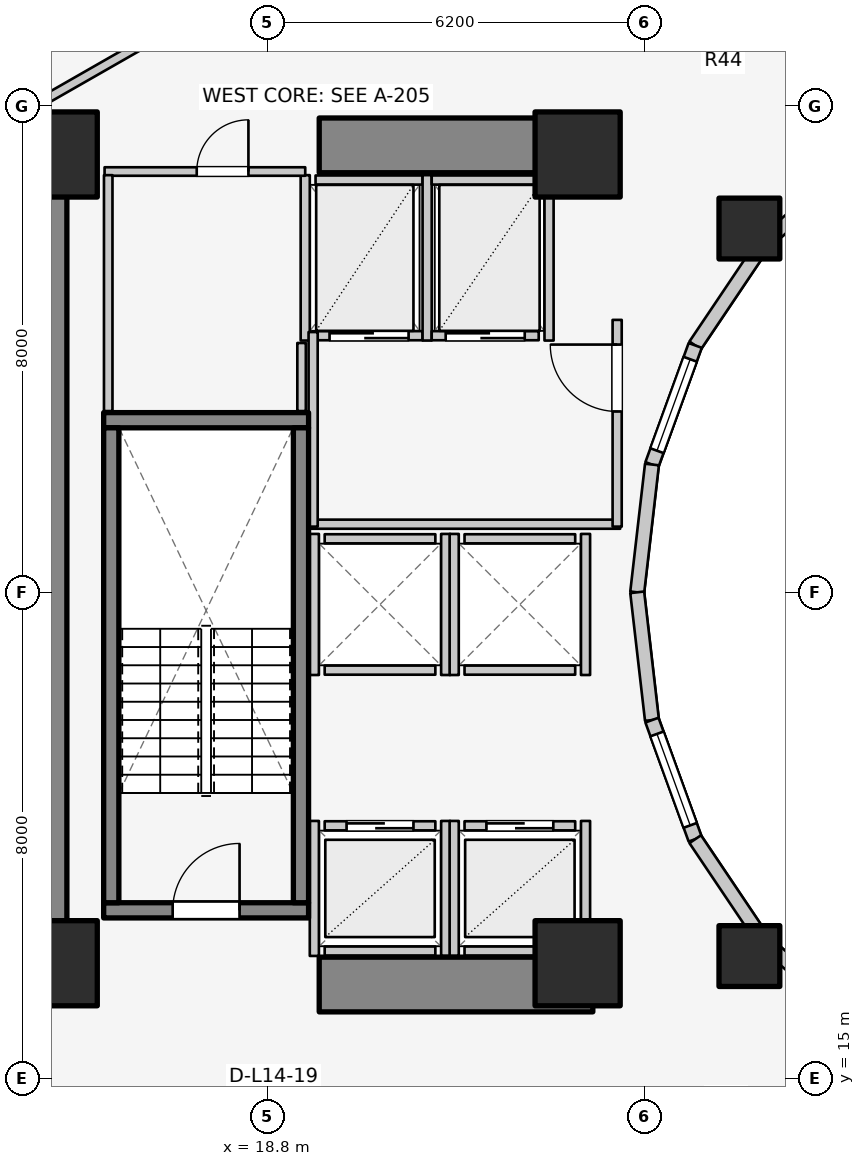
"""IFC4 building model, lengths in metres.
Left out: names, types, materials, properties, quantities, classifications, styles, units other than length and angle.
Written with IfcOpenShell. Run it as: python <this file> out.ifc"""

import sys

from ifc_helpers import new_model, si_unit, direction, frame, frame_2d, origin, origin_2d, place, context, subcontext, project, spatial, rectangle, extrude, element, fill, save


model = new_model("IFC4")
c1 = context("Model", 3, precision=1e-05, world=origin(), true_north=direction((0.0, 1.0)))
c2 = subcontext(c1, "Body", "Model", "MODEL_VIEW")
j1 = project(units=[si_unit("LENGTHUNIT", "METRE"), si_unit("PLANEANGLEUNIT", "RADIAN")], contexts=[c1])
p1 = place(None, origin())
s1 = spatial("IfcSite", under=j1, at=p1, CompositionType="ELEMENT")
p2 = place(p1, origin())
s2 = spatial("IfcBuilding", under=s1, at=p2, CompositionType="ELEMENT")
p3 = place(p2, frame((0.0, 0.0, 49.3)))
s3 = spatial("IfcBuildingStorey", under=s2, at=p3, CompositionType="ELEMENT", Elevation=49.3)
p4 = place(p3, frame((15.05, 17.05, 0.0), z_axis=(0.0, 0.0, 1.0), x_axis=(0.0, 1.0, 0.0)))
e1 = element("IfcWall", 1, at=p4, inside=s3, PredefinedType="SHEAR", context=c2, shape_type="SweptSolid", body=[
    extrude(rectangle(XDim=12.8, YDim=0.9, at=frame_2d((6.4, 0.0))), origin(), (0.0, 0.0, 1.0), 3.1),
])
for number, where, z_axis, x_axis in (
    (2, (19.65, 16.55, 0.0), (0.0, 0.0, 1.0), (1.0, 0.0, 0.0)),
    (3, (19.65, 30.35, 0.0), (0.0, 0.0, 1.0), (1.0, 0.0, 0.0)),
):
    element("IfcWall", number, at=place(p3, frame(where, z_axis=z_axis, x_axis=x_axis)), inside=s3, PredefinedType="SHEAR", context=c2, shape_type="SweptSolid", body=[
        extrude(rectangle(XDim=4.5, YDim=0.9, at=frame_2d((2.25, 0.0))), origin(), (0.0, 0.0, 1.0), 3.1),
    ])
p5 = place(p3, frame((16.105, 17.77, 0.0), z_axis=(0.0, 0.0, 1.0), x_axis=(1.0, 0.0, 0.0)))
e4 = element("IfcWall", 4, at=p5, inside=s3, PredefinedType="SOLIDWALL", context=c2, shape_type="SweptSolid", body=[
    extrude(rectangle(XDim=3.37, YDim=0.25, at=frame_2d((1.685, 0.0))), origin(), (0.0, 0.0, 1.0), 3.1),
])
p6 = place(p5, frame((1.135, 0.0, 0.0)))
e5 = element("IfcOpeningElement", 5, at=p6, cuts=e4, PredefinedType="OPENING", context=c2, shape_type="SweptSolid", body=[
    extrude(rectangle(XDim=1.1, YDim=2.1, at=frame_2d((0.55, 1.05))), frame((0.0, 0.135, 0.0), z_axis=(0.0, -1.0, 0.0), x_axis=(1.0, 0.0, 0.0)), (0.0, 0.0, 1.0), 0.27),
])
p7 = place(p3, frame((16.105, 25.83, 0.0), z_axis=(0.0, 0.0, 1.0), x_axis=(1.0, 0.0, 0.0)))
e6 = element("IfcWall", 6, at=p7, inside=s3, PredefinedType="SOLIDWALL", context=c2, shape_type="SweptSolid", body=[
    extrude(rectangle(XDim=3.37, YDim=0.25, at=frame_2d((1.685, 0.0))), origin(), (0.0, 0.0, 1.0), 3.1),
])
for number, where, z_axis, x_axis in (
    (7, (16.23, 17.895, 0.0), (0.0, 0.0, 1.0), (0.0, 1.0, 0.0)),
    (8, (19.35, 17.895, 0.0), (0.0, 0.0, 1.0), (0.0, 1.0, 0.0)),
):
    element("IfcWall", number, at=place(p3, frame(where, z_axis=z_axis, x_axis=x_axis)), inside=s3, PredefinedType="SOLIDWALL", context=c2, shape_type="SweptSolid", body=[
        extrude(rectangle(XDim=7.81, YDim=0.25, at=frame_2d((3.905, 0.0))), origin(), (0.0, 0.0, 1.0), 3.1),
    ])
for number, where, z_axis, x_axis in (
    (9, (15.3, 16.9, 0.0), (0.0, 0.0, 1.0), (1.0, 0.0, 0.0)),
    (10, (23.9, 16.9, 0.0), (0.0, 0.0, 1.0), (1.0, 0.0, 0.0)),
    (11, (23.9, 30.2, 0.0), (0.0, 0.0, 1.0), (1.0, 0.0, 0.0)),
    (12, (15.3, 30.2, 0.0), (0.0, 0.0, 1.0), (1.0, 0.0, 0.0)),
):
    element("IfcColumn", number, at=place(p3, frame(where, z_axis=z_axis, x_axis=x_axis)), inside=s3, PredefinedType="COLUMN", context=c2, shape_type="SweptSolid", body=[
        extrude(rectangle(XDim=1.4, YDim=1.4, at=origin_2d()), origin(), (0.0, 0.0, 1.0), 3.1),
    ])
for number, where, z_axis, x_axis in (
    (13, (26.725, 28.982, 0.0), (0.0, 0.0, 1.0), (1.0, 0.0, 0.0)),
    (14, (26.725, 17.018, 0.0), (0.0, 0.0, 1.0), (1.0, 0.0, 0.0)),
):
    element("IfcColumn", number, at=place(p3, frame(where, z_axis=z_axis, x_axis=x_axis)), inside=s3, PredefinedType="COLUMN", context=c2, shape_type="SweptSolid", body=[
        extrude(rectangle(XDim=1.0, YDim=1.0, at=origin_2d()), origin(), (0.0, 0.0, 1.0), 3.1),
    ])
p8 = place(p3, frame((28.44, 30.032, 0.0), z_axis=(0.0, 0.0, 1.0), x_axis=(-0.752576694707, -0.658504607869, 0.0)))
e15 = element("IfcWall", 15, at=p8, inside=s3, PredefinedType="STANDARD", context=c2, shape_type="SweptSolid", body=[
    extrude(rectangle(XDim=1.959, YDim=0.23, at=frame_2d((0.98, 0.0))), origin(), (0.0, 0.0, 1.0), 2.16),
])
p9 = place(p3, frame((26.965, 28.742, 0.0), z_axis=(0.0, 0.0, 1.0), x_axis=(-0.558197800898, -0.829707909492, 0.0)))
e16 = element("IfcWall", 16, at=p9, inside=s3, PredefinedType="STANDARD", context=c2, shape_type="SweptSolid", body=[
    extrude(rectangle(XDim=2.027, YDim=0.23, at=frame_2d((1.013, 0.0))), origin(), (0.0, 0.0, 1.0), 2.16),
])
p10 = place(p3, frame((25.834, 27.06, 0.0), z_axis=(0.0, 0.0, 1.0), x_axis=(-0.341423187295, -0.93990968033, 0.0)))
e17 = element("IfcWall", 17, at=p10, inside=s3, PredefinedType="STANDARD", context=c2, shape_type="SweptSolid", body=[
    extrude(rectangle(XDim=2.084, YDim=0.23, at=frame_2d((1.042, 0.0))), origin(), (0.0, 0.0, 1.0), 2.84),
])
p11 = place(p10, frame((0.242, 0.0, 0.85)))
e18 = element("IfcOpeningElement", 18, at=p11, cuts=e17, PredefinedType="OPENING", context=c2, shape_type="SweptSolid", body=[
    extrude(rectangle(XDim=1.6, YDim=1.65, at=frame_2d((0.8, 0.825))), frame((0.0, 0.125, 0.0), z_axis=(0.0, -1.0, 0.0), x_axis=(1.0, 0.0, 0.0)), (0.0, 0.0, 1.0), 0.25),
])
for number, where, z_axis, x_axis in (
    (19, (25.123, 25.102, 0.0), (0.0, 0.0, 1.0), (-0.115, -0.993, 0.0)),
    (20, (24.88, 23.0, 0.0), (0.0, 0.0, 1.0), (0.115, -0.993, 0.0)),
):
    element("IfcWall", number, at=place(p3, frame(where, z_axis=z_axis, x_axis=x_axis)), inside=s3, PredefinedType="STANDARD", context=c2, shape_type="SweptSolid", body=[
        extrude(rectangle(XDim=2.115, YDim=0.23, at=frame_2d((1.058, 0.0))), origin(), (0.0, 0.0, 1.0), 2.84),
    ])
p12 = place(p3, frame((25.123, 20.898, 0.0), z_axis=(0.0, 0.0, 1.0), x_axis=(0.341423187295, -0.93990968033, 0.0)))
e21 = element("IfcWall", 21, at=p12, inside=s3, PredefinedType="STANDARD", context=c2, shape_type="SweptSolid", body=[
    extrude(rectangle(XDim=2.084, YDim=0.23, at=frame_2d((1.042, 0.0))), origin(), (0.0, 0.0, 1.0), 2.84),
])
p13 = place(p12, frame((0.242, 0.0, 0.85)))
e22 = element("IfcOpeningElement", 22, at=p13, cuts=e21, PredefinedType="OPENING", context=c2, shape_type="SweptSolid", body=[
    extrude(rectangle(XDim=1.6, YDim=1.65, at=frame_2d((0.8, 0.825))), frame((0.0, 0.125, 0.0), z_axis=(0.0, -1.0, 0.0), x_axis=(1.0, 0.0, 0.0)), (0.0, 0.0, 1.0), 0.25),
])
p14 = place(p3, frame((25.834, 18.94, 0.0), z_axis=(0.0, 0.0, 1.0), x_axis=(0.558197800898, -0.829707909492, 0.0)))
e23 = element("IfcWall", 23, at=p14, inside=s3, PredefinedType="STANDARD", context=c2, shape_type="SweptSolid", body=[
    extrude(rectangle(XDim=2.027, YDim=0.23, at=frame_2d((1.013, 0.0))), origin(), (0.0, 0.0, 1.0), 2.16),
])
p15 = place(p3, frame((26.965, 17.258, 0.0), z_axis=(0.0, 0.0, 1.0), x_axis=(0.752576694707, -0.658504607869, 0.0)))
e24 = element("IfcWall", 24, at=p15, inside=s3, PredefinedType="STANDARD", context=c2, shape_type="SweptSolid", body=[
    extrude(rectangle(XDim=1.959, YDim=0.23, at=frame_2d((0.98, 0.0))), origin(), (0.0, 0.0, 1.0), 2.16),
])
p16 = place(p3, frame((19.74, 19.16, 0.0), z_axis=(0.0, 0.0, 1.0), x_axis=(1.0, 0.0, 0.0)))
e25 = element("IfcWall", 25, at=p16, inside=s3, PredefinedType="SOLIDWALL", context=c2, shape_type="SweptSolid", body=[
    extrude(rectangle(XDim=1.82, YDim=0.15, at=frame_2d((0.91, 0.0))), origin(), (0.0, 0.0, 1.0), 2.855),
])
p17 = place(p16, frame((0.36, 0.0, 0.0)))
e26 = element("IfcOpeningElement", 26, at=p17, cuts=e25, PredefinedType="OPENING", context=c2, shape_type="SweptSolid", body=[
    extrude(rectangle(XDim=1.1, YDim=2.1, at=frame_2d((0.55, 1.05))), frame((0.0, 0.085, 0.0), z_axis=(0.0, -1.0, 0.0), x_axis=(1.0, 0.0, 0.0)), (0.0, 0.0, 1.0), 0.17),
])
p18 = place(p3, frame((19.74, 17.1, 0.0), z_axis=(0.0, 0.0, 1.0), x_axis=(1.0, 0.0, 0.0)))
e27 = element("IfcWall", 27, at=p18, inside=s3, PredefinedType="SOLIDWALL", context=c2, shape_type="SweptSolid", body=[
    extrude(rectangle(XDim=1.82, YDim=0.15, at=frame_2d((0.91, 0.0))), origin(), (0.0, 0.0, 1.0), 2.855),
])
p19 = place(p3, frame((19.57, 17.02, 0.0), z_axis=(0.0, 0.0, 1.0), x_axis=(0.0, 1.0, 0.0)))
e28 = element("IfcWall", 28, at=p19, inside=s3, PredefinedType="SOLIDWALL", context=c2, shape_type="SweptSolid", body=[
    extrude(rectangle(XDim=2.22, YDim=0.15, at=frame_2d((1.11, 0.0))), origin(), (0.0, 0.0, 1.0), 2.12),
])
p20 = place(p3, frame((21.73, 17.02, 0.0), z_axis=(0.0, 0.0, 1.0), x_axis=(0.0, 1.0, 0.0)))
e29 = element("IfcWall", 29, at=p20, inside=s3, PredefinedType="SOLIDWALL", context=c2, shape_type="SweptSolid", body=[
    extrude(rectangle(XDim=2.22, YDim=0.15, at=frame_2d((1.11, 0.0))), origin(), (0.0, 0.0, 1.0), 2.855),
])
p21 = place(p3, frame((22.04, 19.16, 0.0), z_axis=(0.0, 0.0, 1.0), x_axis=(1.0, 0.0, 0.0)))
e30 = element("IfcWall", 30, at=p21, inside=s3, PredefinedType="SOLIDWALL", context=c2, shape_type="SweptSolid", body=[
    extrude(rectangle(XDim=1.82, YDim=0.15, at=frame_2d((0.91, 0.0))), origin(), (0.0, 0.0, 1.0), 2.12),
])
p22 = place(p21, frame((0.36, 0.0, 0.0)))
e31 = element("IfcOpeningElement", 31, at=p22, cuts=e30, PredefinedType="OPENING", context=c2, shape_type="SweptSolid", body=[
    extrude(rectangle(XDim=1.1, YDim=2.1, at=frame_2d((0.55, 1.05))), frame((0.0, 0.085, 0.0), z_axis=(0.0, -1.0, 0.0), x_axis=(1.0, 0.0, 0.0)), (0.0, 0.0, 1.0), 0.17),
])
p23 = place(p3, frame((22.04, 17.1, 0.0), z_axis=(0.0, 0.0, 1.0), x_axis=(1.0, 0.0, 0.0)))
e32 = element("IfcWall", 32, at=p23, inside=s3, PredefinedType="SOLIDWALL", context=c2, shape_type="SweptSolid", body=[
    extrude(rectangle(XDim=1.82, YDim=0.15, at=frame_2d((0.91, 0.0))), origin(), (0.0, 0.0, 1.0), 2.12),
])
p24 = place(p3, frame((21.87, 17.02, 0.0), z_axis=(0.0, 0.0, 1.0), x_axis=(0.0, 1.0, 0.0)))
e33 = element("IfcWall", 33, at=p24, inside=s3, PredefinedType="SOLIDWALL", context=c2, shape_type="SweptSolid", body=[
    extrude(rectangle(XDim=2.22, YDim=0.15, at=frame_2d((1.11, 0.0))), origin(), (0.0, 0.0, 1.0), 2.855),
])
p25 = place(p3, frame((24.03, 17.02, 0.0), z_axis=(0.0, 0.0, 1.0), x_axis=(0.0, 1.0, 0.0)))
e34 = element("IfcWall", 34, at=p25, inside=s3, PredefinedType="SOLIDWALL", context=c2, shape_type="SweptSolid", body=[
    extrude(rectangle(XDim=2.22, YDim=0.15, at=frame_2d((1.11, 0.0))), origin(), (0.0, 0.0, 1.0), 2.12),
])
for number, where, z_axis, x_axis in (
    (35, (19.74, 21.72, 0.0), (0.0, 0.0, 1.0), (1.0, 0.0, 0.0)),
    (36, (19.74, 23.88, 0.0), (0.0, 0.0, 1.0), (1.0, 0.0, 0.0)),
):
    element("IfcWall", number, at=place(p3, frame(where, z_axis=z_axis, x_axis=x_axis)), inside=s3, PredefinedType="SOLIDWALL", context=c2, shape_type="SweptSolid", body=[
        extrude(rectangle(XDim=1.82, YDim=0.15, at=frame_2d((0.91, 0.0))), origin(), (0.0, 0.0, 1.0), 2.855),
    ])
for number, where, z_axis, x_axis in (
    (37, (19.57, 21.64, 0.0), (0.0, 0.0, 1.0), (0.0, 1.0, 0.0)),
    (38, (21.73, 21.64, 0.0), (0.0, 0.0, 1.0), (0.0, 1.0, 0.0)),
):
    element("IfcWall", number, at=place(p3, frame(where, z_axis=z_axis, x_axis=x_axis)), inside=s3, PredefinedType="SOLIDWALL", context=c2, shape_type="SweptSolid", body=[
        extrude(rectangle(XDim=2.32, YDim=0.15, at=frame_2d((1.16, 0.0))), origin(), (0.0, 0.0, 1.0), 2.855),
    ])
for number, where, z_axis, x_axis in (
    (39, (22.04, 21.72, 0.0), (0.0, 0.0, 1.0), (1.0, 0.0, 0.0)),
    (40, (22.04, 23.88, 0.0), (0.0, 0.0, 1.0), (1.0, 0.0, 0.0)),
):
    element("IfcWall", number, at=place(p3, frame(where, z_axis=z_axis, x_axis=x_axis)), inside=s3, PredefinedType="SOLIDWALL", context=c2, shape_type="SweptSolid", body=[
        extrude(rectangle(XDim=1.82, YDim=0.15, at=frame_2d((0.91, 0.0))), origin(), (0.0, 0.0, 1.0), 2.12),
    ])
p26 = place(p3, frame((21.87, 21.64, 0.0), z_axis=(0.0, 0.0, 1.0), x_axis=(0.0, 1.0, 0.0)))
e41 = element("IfcWall", 41, at=p26, inside=s3, PredefinedType="SOLIDWALL", context=c2, shape_type="SweptSolid", body=[
    extrude(rectangle(XDim=2.32, YDim=0.15, at=frame_2d((1.16, 0.0))), origin(), (0.0, 0.0, 1.0), 2.855),
])
p27 = place(p3, frame((24.03, 21.64, 0.0), z_axis=(0.0, 0.0, 1.0), x_axis=(0.0, 1.0, 0.0)))
e42 = element("IfcWall", 42, at=p27, inside=s3, PredefinedType="SOLIDWALL", context=c2, shape_type="SweptSolid", body=[
    extrude(rectangle(XDim=2.32, YDim=0.15, at=frame_2d((1.16, 0.0))), origin(), (0.0, 0.0, 1.0), 2.12),
])
p28 = place(p3, frame((19.59, 27.22, 0.0), z_axis=(0.0, 0.0, 1.0), x_axis=(1.0, 0.0, 0.0)))
e43 = element("IfcWall", 43, at=p28, inside=s3, PredefinedType="SOLIDWALL", context=c2, shape_type="SweptSolid", body=[
    extrude(rectangle(XDim=1.76, YDim=0.15, at=frame_2d((0.88, 0.0))), origin(), (0.0, 0.0, 1.0), 2.855),
])
p29 = place(p28, frame((0.23, 0.0, 0.0)))
e44 = element("IfcOpeningElement", 44, at=p29, cuts=e43, PredefinedType="OPENING", context=c2, shape_type="SweptSolid", body=[
    extrude(rectangle(XDim=1.3, YDim=2.1, at=frame_2d((0.65, 1.05))), frame((0.0, 0.085, 0.0), z_axis=(0.0, -1.0, 0.0), x_axis=(1.0, 0.0, 0.0)), (0.0, 0.0, 1.0), 0.17),
])
p30 = place(p3, frame((19.59, 29.78, 0.0), z_axis=(0.0, 0.0, 1.0), x_axis=(1.0, 0.0, 0.0)))
e45 = element("IfcWall", 45, at=p30, inside=s3, PredefinedType="SOLIDWALL", context=c2, shape_type="SweptSolid", body=[
    extrude(rectangle(XDim=1.76, YDim=0.15, at=frame_2d((0.88, 0.0))), origin(), (0.0, 0.0, 1.0), 2.855),
])
for number, where, z_axis, x_axis in (
    (46, (19.42, 27.14, 0.0), (0.0, 0.0, 1.0), (0.0, 1.0, 0.0)),
    (47, (21.425, 27.14, 0.0), (0.0, 0.0, 1.0), (0.0, 1.0, 0.0)),
):
    element("IfcWall", number, at=place(p3, frame(where, z_axis=z_axis, x_axis=x_axis)), inside=s3, PredefinedType="SOLIDWALL", context=c2, shape_type="SweptSolid", body=[
        extrude(rectangle(XDim=2.72, YDim=0.15, at=frame_2d((1.36, 0.0))), origin(), (0.0, 0.0, 1.0), 2.855),
    ])
p31 = place(p3, frame((21.5, 27.22, 0.0), z_axis=(0.0, 0.0, 1.0), x_axis=(1.0, 0.0, 0.0)))
e48 = element("IfcWall", 48, at=p31, inside=s3, PredefinedType="SOLIDWALL", context=c2, shape_type="SweptSolid", body=[
    extrude(rectangle(XDim=1.76, YDim=0.15, at=frame_2d((0.88, 0.0))), origin(), (0.0, 0.0, 1.0), 2.855),
])
p32 = place(p31, frame((0.23, 0.0, 0.0)))
e49 = element("IfcOpeningElement", 49, at=p32, cuts=e48, PredefinedType="OPENING", context=c2, shape_type="SweptSolid", body=[
    extrude(rectangle(XDim=1.3, YDim=2.1, at=frame_2d((0.65, 1.05))), frame((0.0, 0.085, 0.0), z_axis=(0.0, -1.0, 0.0), x_axis=(1.0, 0.0, 0.0)), (0.0, 0.0, 1.0), 0.17),
])
p33 = place(p3, frame((21.5, 29.78, 0.0), z_axis=(0.0, 0.0, 1.0), x_axis=(1.0, 0.0, 0.0)))
e50 = element("IfcWall", 50, at=p33, inside=s3, PredefinedType="SOLIDWALL", context=c2, shape_type="SweptSolid", body=[
    extrude(rectangle(XDim=1.76, YDim=0.15, at=frame_2d((0.88, 0.0))), origin(), (0.0, 0.0, 1.0), 2.855),
])
p34 = place(p3, frame((23.43, 27.14, 0.0), z_axis=(0.0, 0.0, 1.0), x_axis=(0.0, 1.0, 0.0)))
e51 = element("IfcWall", 51, at=p34, inside=s3, PredefinedType="SOLIDWALL", context=c2, shape_type="SweptSolid", body=[
    extrude(rectangle(XDim=2.72, YDim=0.15, at=frame_2d((1.36, 0.0))), origin(), (0.0, 0.0, 1.0), 2.855),
])
p35 = place(p3, frame((19.52, 24.12, 0.0), z_axis=(0.0, 0.0, 1.0), x_axis=(1.0, 0.0, 0.0)))
e52 = element("IfcWall", 52, at=p35, inside=s3, PredefinedType="PARTITIONING", context=c2, shape_type="SweptSolid", body=[
    extrude(rectangle(XDim=5.08, YDim=0.15, at=frame_2d((2.54, 0.0))), origin(), (0.0, 0.0, 1.0), 2.12),
])
p36 = place(p3, frame((19.55, 24.08, 0.0), z_axis=(0.0, 0.0, 1.0), x_axis=(0.0, 1.0, 0.0)))
e53 = element("IfcWall", 53, at=p36, inside=s3, PredefinedType="PARTITIONING", context=c2, shape_type="SweptSolid", body=[
    extrude(rectangle(XDim=3.2, YDim=0.15, at=frame_2d((1.6, 0.0))), origin(), (0.0, 0.0, 1.0), 2.855),
])
p37 = place(p3, frame((24.55, 24.08, 0.0), z_axis=(0.0, 0.0, 1.0), x_axis=(0.0, 1.0, 0.0)))
e54 = element("IfcWall", 54, at=p37, inside=s3, PredefinedType="PARTITIONING", context=c2, shape_type="SweptSolid", body=[
    extrude(rectangle(XDim=3.4, YDim=0.15, at=frame_2d((1.7, 0.0))), origin(), (0.0, 0.0, 1.0), 2.855),
])
p38 = place(p37, frame((1.894, 0.0, 0.0)))
e55 = element("IfcOpeningElement", 55, at=p38, cuts=e54, PredefinedType="OPENING", context=c2, shape_type="SweptSolid", body=[
    extrude(rectangle(XDim=1.1, YDim=2.1, at=frame_2d((0.55, 1.05))), frame((0.0, 0.085, 0.0), z_axis=(0.0, -1.0, 0.0), x_axis=(1.0, 0.0, 0.0)), (0.0, 0.0, 1.0), 0.17),
])
p39 = place(p3, frame((16.12, 29.92, 0.0), z_axis=(0.0, 0.0, 1.0), x_axis=(1.0, 0.0, 0.0)))
e56 = element("IfcWall", 56, at=p39, inside=s3, PredefinedType="PLUMBINGWALL", context=c2, shape_type="SweptSolid", body=[
    extrude(rectangle(XDim=3.3, YDim=0.14, at=frame_2d((1.65, 0.0))), origin(), (0.0, 0.0, 1.0), 2.855),
])
p40 = place(p39, frame((1.516, 0.0, 0.0)))
e57 = element("IfcOpeningElement", 57, at=p40, cuts=e56, PredefinedType="OPENING", context=c2, shape_type="SweptSolid", body=[
    extrude(rectangle(XDim=0.85, YDim=2.05, at=frame_2d((0.425, 1.025))), frame((0.0, 0.08, 0.0), z_axis=(0.0, -1.0, 0.0), x_axis=(1.0, 0.0, 0.0)), (0.0, 0.0, 1.0), 0.16),
])
p41 = place(p3, frame((16.18, 25.98, 0.0), z_axis=(0.0, 0.0, 1.0), x_axis=(0.0, 1.0, 0.0)))
e58 = element("IfcWall", 58, at=p41, inside=s3, PredefinedType="PLUMBINGWALL", context=c2, shape_type="SweptSolid", body=[
    extrude(rectangle(XDim=3.88, YDim=0.14, at=frame_2d((1.94, 0.0))), origin(), (0.0, 0.0, 1.0), 2.855),
])
p42 = place(p3, frame((19.36, 25.98, 0.0), z_axis=(0.0, 0.0, 1.0), x_axis=(0.0, 1.0, 0.0)))
e59 = element("IfcWall", 59, at=p42, inside=s3, PredefinedType="PLUMBINGWALL", context=c2, shape_type="SweptSolid", body=[
    extrude(rectangle(XDim=1.12, YDim=0.14, at=frame_2d((0.56, 0.0))), origin(), (0.0, 0.0, 1.0), 2.855),
])
p43 = place(p3, frame((17.243, 32.305, 0.0), z_axis=(0.0, 0.0, 1.0), x_axis=(-0.867991349648, -0.496579315857, 0.0)))
e60 = element("IfcWall", 60, at=p43, inside=s3, PredefinedType="PARTITIONING", context=c2, shape_type="SweptSolid", body=[
    extrude(rectangle(XDim=2.567, YDim=0.15, at=frame_2d((1.283, 0.0))), origin(), (0.0, 0.0, 1.0), 2.069),
])
p44 = place(p11, origin())
e61 = element("IfcWindow", 61, at=p44, inside=s3, PartitioningType="SINGLE_PANEL", PredefinedType="WINDOW", context=c2, shape_type="SweptSolid", body=[
    extrude(rectangle(XDim=1.6, YDim=1.65, at=frame_2d((0.8, 0.825))), frame((0.0, 0.03, 0.0), z_axis=(0.0, -1.0, 0.0), x_axis=(1.0, 0.0, 0.0)), (0.0, 0.0, 1.0), 0.06),
])
fill(e18, e61)
p45 = place(p13, origin())
e62 = element("IfcWindow", 62, at=p45, inside=s3, PartitioningType="SINGLE_PANEL", PredefinedType="WINDOW", context=c2, shape_type="SweptSolid", body=[
    extrude(rectangle(XDim=1.6, YDim=1.65, at=frame_2d((0.8, 0.825))), frame((0.0, 0.03, 0.0), z_axis=(0.0, -1.0, 0.0), x_axis=(1.0, 0.0, 0.0)), (0.0, 0.0, 1.0), 0.06),
])
fill(e22, e62)
p46 = place(p6, origin())
e63 = element("IfcDoor", 63, at=p46, inside=s3, OperationType="SINGLE_SWING_RIGHT", PredefinedType="DOOR", context=c2, shape_type="SweptSolid", body=[
    extrude(rectangle(XDim=1.1, YDim=2.1, at=frame_2d((0.55, 1.05))), frame((0.0, 0.025, 0.0), z_axis=(0.0, -1.0, 0.0), x_axis=(1.0, 0.0, 0.0)), (0.0, 0.0, 1.0), 0.05),
])
fill(e5, e63)
p47 = place(p17, origin())
e64 = element("IfcDoor", 64, at=p47, inside=s3, OperationType="DOUBLE_DOOR_SLIDING", PredefinedType="DOOR", context=c2, shape_type="SweptSolid", body=[
    extrude(rectangle(XDim=1.1, YDim=2.1, at=frame_2d((0.55, 1.05))), frame((0.0, 0.025, 0.0), z_axis=(0.0, -1.0, 0.0), x_axis=(1.0, 0.0, 0.0)), (0.0, 0.0, 1.0), 0.05),
])
fill(e26, e64)
p48 = place(p22, origin())
e65 = element("IfcDoor", 65, at=p48, inside=s3, OperationType="DOUBLE_DOOR_SLIDING", PredefinedType="DOOR", context=c2, shape_type="SweptSolid", body=[
    extrude(rectangle(XDim=1.1, YDim=2.1, at=frame_2d((0.55, 1.05))), frame((0.0, 0.025, 0.0), z_axis=(0.0, -1.0, 0.0), x_axis=(1.0, 0.0, 0.0)), (0.0, 0.0, 1.0), 0.05),
])
fill(e31, e65)
p49 = place(p29, origin())
e66 = element("IfcDoor", 66, at=p49, inside=s3, OperationType="DOUBLE_DOOR_SLIDING", PredefinedType="DOOR", context=c2, shape_type="SweptSolid", body=[
    extrude(rectangle(XDim=1.3, YDim=2.1, at=frame_2d((0.65, 1.05))), frame((0.0, 0.025, 0.0), z_axis=(0.0, -1.0, 0.0), x_axis=(1.0, 0.0, 0.0)), (0.0, 0.0, 1.0), 0.05),
])
fill(e44, e66)
p50 = place(p32, origin())
e67 = element("IfcDoor", 67, at=p50, inside=s3, OperationType="DOUBLE_DOOR_SLIDING", PredefinedType="DOOR", context=c2, shape_type="SweptSolid", body=[
    extrude(rectangle(XDim=1.3, YDim=2.1, at=frame_2d((0.65, 1.05))), frame((0.0, 0.025, 0.0), z_axis=(0.0, -1.0, 0.0), x_axis=(1.0, 0.0, 0.0)), (0.0, 0.0, 1.0), 0.05),
])
fill(e49, e67)
p51 = place(p38, origin())
e68 = element("IfcDoor", 68, at=p51, inside=s3, OperationType="SINGLE_SWING_RIGHT", PredefinedType="DOOR", context=c2, shape_type="SweptSolid", body=[
    extrude(rectangle(XDim=1.1, YDim=2.1, at=frame_2d((0.55, 1.05))), frame((0.0, 0.025, 0.0), z_axis=(0.0, -1.0, 0.0), x_axis=(1.0, 0.0, 0.0)), (0.0, 0.0, 1.0), 0.05),
])
fill(e55, e68)
p52 = place(p40, origin())
e69 = element("IfcDoor", 69, at=p52, inside=s3, OperationType="SINGLE_SWING_RIGHT", PredefinedType="DOOR", context=c2, shape_type="SweptSolid", body=[
    extrude(rectangle(XDim=0.85, YDim=2.05, at=frame_2d((0.425, 1.025))), frame((0.0, 0.025, 0.0), z_axis=(0.0, -1.0, 0.0), x_axis=(1.0, 0.0, 0.0)), (0.0, 0.0, 1.0), 0.05),
])
fill(e57, e69)
save(model, sys.argv[1])
